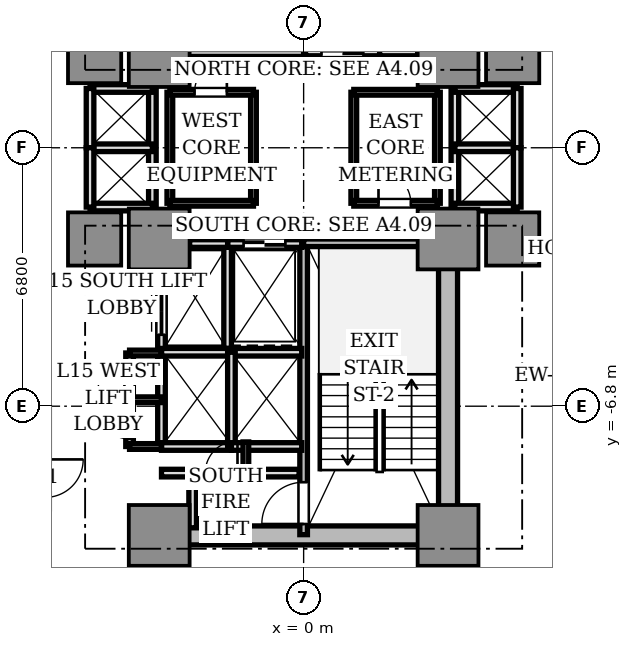
"""IFC4 building model, lengths in metres.
Left out: names, types, materials, properties, quantities, classifications, styles, units other than length and angle.
Written with IfcOpenShell. Run it as: python <this file> out.ifc"""

import sys

from ifc_helpers import new_model, si_unit, direction, frame, frame_2d, origin, origin_2d, place, context, subcontext, project, spatial, rectangle, extrude, source, transform, mapped, element, fill, save


model = new_model("IFC4")
c1 = context("Model", 3, precision=1e-05, world=origin(), true_north=direction((0.0, 1.0)))
c2 = subcontext(c1, "Body", "Model", "MODEL_VIEW")
j1 = project(units=[si_unit("LENGTHUNIT", "METRE"), si_unit("PLANEANGLEUNIT", "RADIAN")], contexts=[c1])
p1 = place(None, origin())
s1 = spatial("IfcSite", under=j1, at=p1, CompositionType="ELEMENT")
p2 = place(p1, origin())
s2 = spatial("IfcBuilding", under=s1, at=p2, CompositionType="ELEMENT")
p3 = place(p2, frame((0.0, 0.0, 57.75)))
s3 = spatial("IfcBuildingStorey", under=s2, at=p3, CompositionType="ELEMENT", Elevation=57.75)
p4 = place(p3, frame((-3.55, -10.2, 0.0), z_axis=(0.0, 0.0, 1.0), x_axis=(1.0, 0.0, 0.0)))
e1 = element("IfcWall", 1, at=p4, inside=s3, PredefinedType="SHEAR", context=c2, shape_type="SweptSolid", body=[
    extrude(rectangle(XDim=7.1, YDim=0.5, at=frame_2d((3.55, 0.0))), origin(), (0.0, 0.0, 1.0), 3.11),
])
p5 = place(p3, frame((3.8, -9.75, 0.0), z_axis=(0.0, 0.0, 1.0), x_axis=(0.0, 1.0, 0.0)))
e2 = element("IfcWall", 2, at=p5, inside=s3, PredefinedType="SHEAR", context=c2, shape_type="SweptSolid", body=[
    extrude(rectangle(XDim=6.9, YDim=0.5, at=frame_2d((3.45, 0.0))), origin(), (0.0, 0.0, 1.0), 3.11),
])
m1 = source(origin(), c2, "Body", "SweptSolid", [
    extrude(rectangle(XDim=1.6, YDim=1.6, at=origin_2d()), origin(), (0.0, 0.0, 1.0), 3.11),
])
for number, where, z_axis, x_axis in (
    (3, (-3.8, 2.4, 0.0), (0.0, 0.0, 1.0), (1.0, 0.0, 0.0)),
    (4, (3.8, 2.4, 0.0), (0.0, 0.0, 1.0), (1.0, 0.0, 0.0)),
    (5, (-3.8, -2.4, 0.0), (0.0, 0.0, 1.0), (1.0, 0.0, 0.0)),
    (6, (3.8, -2.4, 0.0), (0.0, 0.0, 1.0), (1.0, 0.0, 0.0)),
    (7, (-3.8, -10.2, 0.0), (0.0, 0.0, 1.0), (1.0, 0.0, 0.0)),
    (8, (3.8, -10.2, 0.0), (0.0, 0.0, 1.0), (1.0, 0.0, 0.0)),
):
    element("IfcColumn", number, at=place(p3, frame(where, z_axis=z_axis, x_axis=x_axis)), inside=s3, PredefinedType="COLUMN", context=c2, shape_type="MappedRepresentation", body=[
        mapped(m1, transform((0.0, 0.0, 0.0), scale=1.0)),
    ])
m2 = source(origin(), c2, "Body", "SweptSolid", [
    extrude(rectangle(XDim=1.4, YDim=1.4, at=origin_2d()), origin(), (0.0, 0.0, 1.0), 3.11),
])
for number, where, z_axis, x_axis in (
    (9, (5.5, 2.4, 0.0), (0.0, 0.0, 1.0), (1.0, 0.0, 0.0)),
    (10, (-5.5, 2.4, 0.0), (0.0, 0.0, 1.0), (1.0, 0.0, 0.0)),
    (11, (5.5, -2.4, 0.0), (0.0, 0.0, 1.0), (1.0, 0.0, 0.0)),
    (12, (-5.5, -2.4, 0.0), (0.0, 0.0, 1.0), (1.0, 0.0, 0.0)),
):
    element("IfcColumn", number, at=place(p3, frame(where, z_axis=z_axis, x_axis=x_axis)), inside=s3, PredefinedType="COLUMN", context=c2, shape_type="MappedRepresentation", body=[
        mapped(m2, transform((0.0, 0.0, 0.0), scale=1.0)),
    ])
p6 = place(p3, frame((0.0, 2.5, 0.0), z_axis=(0.0, 0.0, 1.0), x_axis=(0.0, 1.0, 0.0)))
e13 = element("IfcWall", 13, at=p6, inside=s3, PredefinedType="SOLIDWALL", context=c2, shape_type="SweptSolid", body=[
    extrude(rectangle(XDim=7.68, YDim=0.2, at=frame_2d((3.84, 0.0))), origin(), (0.0, 0.0, 1.0), 3.11),
])
p7 = place(p6, frame((6.5, 0.0, 0.0)))
e14 = element("IfcOpeningElement", 14, at=p7, cuts=e13, PredefinedType="OPENING", context=c2, shape_type="SweptSolid", body=[
    extrude(rectangle(XDim=0.95, YDim=2.15, at=frame_2d((0.475, 1.075))), frame((0.0, 0.11, 0.0), z_axis=(0.0, -1.0, 0.0), x_axis=(1.0, 0.0, 0.0)), (0.0, 0.0, 1.0), 0.22),
])
p8 = place(p3, frame((-3.72, 2.5, 0.0), z_axis=(0.0, 0.0, 1.0), x_axis=(1.0, 0.0, 0.0)))
e15 = element("IfcWall", 15, at=p8, inside=s3, PredefinedType="SOLIDWALL", context=c2, shape_type="SweptSolid", body=[
    extrude(rectangle(XDim=3.72, YDim=0.2, at=frame_2d((1.86, 0.0))), origin(), (0.0, 0.0, 1.0), 3.11),
])
p9 = place(p3, frame((0.0, -10.18, 0.0), z_axis=(0.0, 0.0, 1.0), x_axis=(0.0, 1.0, 0.0)))
e16 = element("IfcWall", 16, at=p9, inside=s3, PredefinedType="SOLIDWALL", context=c2, shape_type="SweptSolid", body=[
    extrude(rectangle(XDim=7.68, YDim=0.2, at=frame_2d((3.84, 0.0))), origin(), (0.0, 0.0, 1.0), 3.11),
])
p10 = place(p9, frame((0.28, 0.0, 0.0)))
e17 = element("IfcOpeningElement", 17, at=p10, cuts=e16, PredefinedType="OPENING", context=c2, shape_type="SweptSolid", body=[
    extrude(rectangle(XDim=1.1, YDim=2.15, at=frame_2d((0.55, 1.075))), frame((0.0, 0.11, 0.0), z_axis=(0.0, -1.0, 0.0), x_axis=(1.0, 0.0, 0.0)), (0.0, 0.0, 1.0), 0.22),
])
p11 = place(p3, frame((0.0, -2.5, 0.0), z_axis=(0.0, 0.0, 1.0), x_axis=(1.0, 0.0, 0.0)))
e18 = element("IfcWall", 18, at=p11, inside=s3, PredefinedType="SOLIDWALL", context=c2, shape_type="SweptSolid", body=[
    extrude(rectangle(XDim=3.72, YDim=0.2, at=frame_2d((1.86, 0.0))), origin(), (0.0, 0.0, 1.0), 3.11),
])
p12 = place(p3, frame((2.0, 2.5, 0.0), z_axis=(0.0, 0.0, 1.0), x_axis=(0.0, 1.0, 0.0)))
e19 = element("IfcWall", 19, at=p12, inside=s3, PredefinedType="SOLIDWALL", context=c2, shape_type="SweptSolid", body=[
    extrude(rectangle(XDim=2.78, YDim=0.2, at=frame_2d((1.39, 0.0))), origin(), (0.0, 0.0, 1.0), 2.66),
])
p13 = place(p3, frame((0.05, 2.52, 0.0), z_axis=(0.0, 0.0, 1.0), x_axis=(1.0, 0.0, 0.0)))
e20 = element("IfcWall", 20, at=p13, inside=s3, PredefinedType="SOLIDWALL", context=c2, shape_type="SweptSolid", body=[
    extrude(rectangle(XDim=1.95, YDim=0.2, at=frame_2d((0.975, 0.0))), origin(), (0.0, 0.0, 1.0), 2.66),
])
p14 = place(p13, frame((0.42, 0.0, 0.0)))
e21 = element("IfcOpeningElement", 21, at=p14, cuts=e20, PredefinedType="OPENING", context=c2, shape_type="SweptSolid", body=[
    extrude(rectangle(XDim=1.1, YDim=2.2, at=frame_2d((0.55, 1.1))), frame((0.0, 0.11, 0.0), z_axis=(0.0, -1.0, 0.0), x_axis=(1.0, 0.0, 0.0)), (0.0, 0.0, 1.0), 0.22),
])
p15 = place(p3, frame((-2.0, -5.28, 0.0), z_axis=(0.0, 0.0, 1.0), x_axis=(0.0, 1.0, 0.0)))
e22 = element("IfcWall", 22, at=p15, inside=s3, PredefinedType="SOLIDWALL", context=c2, shape_type="SweptSolid", body=[
    extrude(rectangle(XDim=2.78, YDim=0.2, at=frame_2d((1.39, 0.0))), origin(), (0.0, 0.0, 1.0), 2.66),
])
p16 = place(p3, frame((-2.0, -2.52, 0.0), z_axis=(0.0, 0.0, 1.0), x_axis=(1.0, 0.0, 0.0)))
e23 = element("IfcWall", 23, at=p16, inside=s3, PredefinedType="SOLIDWALL", context=c2, shape_type="SweptSolid", body=[
    extrude(rectangle(XDim=1.95, YDim=0.2, at=frame_2d((0.975, 0.0))), origin(), (0.0, 0.0, 1.0), 2.66),
])
p17 = place(p16, frame((0.42, 0.0, 0.0)))
e24 = element("IfcOpeningElement", 24, at=p17, cuts=e23, PredefinedType="OPENING", context=c2, shape_type="SweptSolid", body=[
    extrude(rectangle(XDim=1.1, YDim=2.2, at=frame_2d((0.55, 1.1))), frame((0.0, 0.11, 0.0), z_axis=(0.0, -1.0, 0.0), x_axis=(1.0, 0.0, 0.0)), (0.0, 0.0, 1.0), 0.22),
])
for number, where, z_axis, x_axis in (
    (25, (2.0, 2.52, 0.0), (0.0, 0.0, 1.0), (1.0, 0.0, 0.0)),
    (26, (-3.0, -2.52, 0.0), (0.0, 0.0, 1.0), (1.0, 0.0, 0.0)),
):
    element("IfcWall", number, at=place(p3, frame(where, z_axis=z_axis, x_axis=x_axis)), inside=s3, PredefinedType="SOLIDWALL", context=c2, shape_type="SweptSolid", body=[
        extrude(rectangle(XDim=1.0, YDim=0.2, at=frame_2d((0.5, 0.0))), origin(), (0.0, 0.0, 1.0), 2.66),
    ])
p18 = place(p3, frame((-3.74, -5.36, 0.0), z_axis=(0.0, 0.0, 1.0), x_axis=(0.0, 1.0, 0.0)))
e27 = element("IfcWall", 27, at=p18, inside=s3, PredefinedType="SOLIDWALL", context=c2, shape_type="SweptSolid", body=[
    extrude(rectangle(XDim=2.08, YDim=0.2, at=frame_2d((1.04, 0.0))), origin(), (0.0, 0.0, 1.0), 2.66),
])
p19 = place(p18, frame((0.44, 0.0, 0.0)))
e28 = element("IfcOpeningElement", 28, at=p19, cuts=e27, PredefinedType="OPENING", context=c2, shape_type="SweptSolid", body=[
    extrude(rectangle(XDim=1.2, YDim=2.2, at=frame_2d((0.6, 1.1))), frame((0.0, 0.11, 0.0), z_axis=(0.0, -1.0, 0.0), x_axis=(1.0, 0.0, 0.0)), (0.0, 0.0, 1.0), 0.22),
])
p20 = place(p3, frame((-3.74, -7.86, 0.0), z_axis=(0.0, 0.0, 1.0), x_axis=(0.0, 1.0, 0.0)))
e29 = element("IfcWall", 29, at=p20, inside=s3, PredefinedType="SOLIDWALL", context=c2, shape_type="SweptSolid", body=[
    extrude(rectangle(XDim=2.48, YDim=0.2, at=frame_2d((1.24, 0.0))), origin(), (0.0, 0.0, 1.0), 2.66),
])
p21 = place(p3, frame((-3.74, -7.86, 0.0), z_axis=(0.0, 0.0, 1.0), x_axis=(1.0, 0.0, 0.0)))
e30 = element("IfcWall", 30, at=p21, inside=s3, PredefinedType="SOLIDWALL", context=c2, shape_type="SweptSolid", body=[
    extrude(rectangle(XDim=1.84, YDim=0.2, at=frame_2d((0.92, 0.0))), origin(), (0.0, 0.0, 1.0), 2.66),
])
p22 = place(p3, frame((-3.74, -5.38, 0.0), z_axis=(0.0, 0.0, 1.0), x_axis=(1.0, 0.0, 0.0)))
e31 = element("IfcWall", 31, at=p22, inside=s3, PredefinedType="SOLIDWALL", context=c2, shape_type="SweptSolid", body=[
    extrude(rectangle(XDim=3.69, YDim=0.2, at=frame_2d((1.845, 0.0))), origin(), (0.0, 0.0, 1.0), 2.66),
])
p23 = place(p3, frame((-1.9, -7.86, 0.0), z_axis=(0.0, 0.0, 1.0), x_axis=(0.0, 1.0, 0.0)))
e32 = element("IfcWall", 32, at=p23, inside=s3, PredefinedType="SOLIDWALL", context=c2, shape_type="SweptSolid", body=[
    extrude(rectangle(XDim=2.48, YDim=0.2, at=frame_2d((1.24, 0.0))), origin(), (0.0, 0.0, 1.0), 2.66),
])
p24 = place(p3, frame((-1.9, -7.86, 0.0), z_axis=(0.0, 0.0, 1.0), x_axis=(1.0, 0.0, 0.0)))
e33 = element("IfcWall", 33, at=p24, inside=s3, PredefinedType="SOLIDWALL", context=c2, shape_type="SweptSolid", body=[
    extrude(rectangle(XDim=1.85, YDim=0.2, at=frame_2d((0.925, 0.0))), origin(), (0.0, 0.0, 1.0), 2.66),
])
p25 = place(p3, frame((3.98, -1.56, 0.0), z_axis=(0.0, 0.0, 1.0), x_axis=(0.0, 1.0, 0.0)))
e34 = element("IfcWall", 34, at=p25, inside=s3, PredefinedType="SOLIDWALL", context=c2, shape_type="SweptSolid", body=[
    extrude(rectangle(XDim=3.12, YDim=0.2, at=frame_2d((1.56, 0.0))), origin(), (0.0, 0.0, 1.0), 2.18),
])
for number, where, z_axis, x_axis in (
    (35, (3.98, 1.56, 0.0), (0.0, 0.0, 1.0), (1.0, 0.0, 0.0)),
    (36, (3.98, -1.56, 0.0), (0.0, 0.0, 1.0), (1.0, 0.0, 0.0)),
    (37, (3.98, 0.0, 0.0), (0.0, 0.0, 1.0), (1.0, 0.0, 0.0)),
):
    element("IfcWall", number, at=place(p3, frame(where, z_axis=z_axis, x_axis=x_axis)), inside=s3, PredefinedType="SOLIDWALL", context=c2, shape_type="SweptSolid", body=[
        extrude(rectangle(XDim=1.64, YDim=0.2, at=frame_2d((0.82, 0.0))), origin(), (0.0, 0.0, 1.0), 2.66),
    ])
for number, where, z_axis, x_axis in (
    (38, (5.62, 0.0, 0.0), (0.0, 0.0, 1.0), (0.0, 1.0, 0.0)),
    (39, (5.62, -1.56, 0.0), (0.0, 0.0, 1.0), (0.0, 1.0, 0.0)),
):
    element("IfcWall", number, at=place(p3, frame(where, z_axis=z_axis, x_axis=x_axis)), inside=s3, PredefinedType="SOLIDWALL", context=c2, shape_type="SweptSolid", body=[
        extrude(rectangle(XDim=1.56, YDim=0.2, at=frame_2d((0.78, 0.0))), origin(), (0.0, 0.0, 1.0), 2.66),
    ])
p26 = place(p3, frame((-3.98, -1.56, 0.0), z_axis=(0.0, 0.0, 1.0), x_axis=(0.0, 1.0, 0.0)))
e40 = element("IfcWall", 40, at=p26, inside=s3, PredefinedType="SOLIDWALL", context=c2, shape_type="SweptSolid", body=[
    extrude(rectangle(XDim=3.12, YDim=0.2, at=frame_2d((1.56, 0.0))), origin(), (0.0, 0.0, 1.0), 2.18),
])
for number, where, z_axis, x_axis in (
    (41, (-5.62, 1.56, 0.0), (0.0, 0.0, 1.0), (1.0, 0.0, 0.0)),
    (42, (-5.62, -1.56, 0.0), (0.0, 0.0, 1.0), (1.0, 0.0, 0.0)),
    (43, (-5.62, 0.0, 0.0), (0.0, 0.0, 1.0), (1.0, 0.0, 0.0)),
):
    element("IfcWall", number, at=place(p3, frame(where, z_axis=z_axis, x_axis=x_axis)), inside=s3, PredefinedType="SOLIDWALL", context=c2, shape_type="SweptSolid", body=[
        extrude(rectangle(XDim=1.64, YDim=0.2, at=frame_2d((0.82, 0.0))), origin(), (0.0, 0.0, 1.0), 2.66),
    ])
for number, where, z_axis, x_axis in (
    (44, (-5.62, 0.0, 0.0), (0.0, 0.0, 1.0), (0.0, 1.0, 0.0)),
    (45, (-5.62, -1.56, 0.0), (0.0, 0.0, 1.0), (0.0, 1.0, 0.0)),
):
    element("IfcWall", number, at=place(p3, frame(where, z_axis=z_axis, x_axis=x_axis)), inside=s3, PredefinedType="SOLIDWALL", context=c2, shape_type="SweptSolid", body=[
        extrude(rectangle(XDim=1.56, YDim=0.2, at=frame_2d((0.78, 0.0))), origin(), (0.0, 0.0, 1.0), 2.66),
    ])
p27 = place(p3, frame((-3.74, -8.56, 0.0), z_axis=(0.0, 0.0, 1.0), x_axis=(1.0, 0.0, 0.0)))
e46 = element("IfcWall", 46, at=p27, inside=s3, PredefinedType="SOLIDWALL", context=c2, shape_type="SweptSolid", body=[
    extrude(rectangle(XDim=3.62, YDim=0.2, at=frame_2d((1.81, 0.0))), origin(), (0.0, 0.0, 1.0), 2.66),
])
p28 = place(p27, frame((1.15, 0.0, 0.0)))
e47 = element("IfcOpeningElement", 47, at=p28, cuts=e46, PredefinedType="OPENING", context=c2, shape_type="SweptSolid", body=[
    extrude(rectangle(XDim=0.85, YDim=2.1, at=frame_2d((0.425, 1.05))), frame((0.0, 0.11, 0.0), z_axis=(0.0, -1.0, 0.0), x_axis=(1.0, 0.0, 0.0)), (0.0, 0.0, 1.0), 0.22),
])
p29 = place(p3, frame((-2.92, -10.0, 0.0), z_axis=(0.0, 0.0, 1.0), x_axis=(0.0, 1.0, 0.0)))
e48 = element("IfcWall", 48, at=p29, inside=s3, PredefinedType="SOLIDWALL", context=c2, shape_type="SweptSolid", body=[
    extrude(rectangle(XDim=1.44, YDim=0.2, at=frame_2d((0.72, 0.0))), origin(), (0.0, 0.0, 1.0), 2.66),
])
p30 = place(p3, frame((-1.52, -8.56, 0.0), z_axis=(0.0, 0.0, 1.0), x_axis=(0.0, 1.0, 0.0)))
e49 = element("IfcWall", 49, at=p30, inside=s3, PredefinedType="PARTITIONING", context=c2, shape_type="SweptSolid", body=[
    extrude(rectangle(XDim=0.82, YDim=0.15, at=frame_2d((0.41, 0.0))), origin(), (0.0, 0.0, 1.0), 2.66),
])
p31 = place(p3, frame((-4.58, -7.86, 0.0), z_axis=(0.0, 0.0, 1.0), x_axis=(0.0, 1.0, 0.0)))
e50 = element("IfcWall", 50, at=p31, inside=s3, PredefinedType="SOLIDWALL", context=c2, shape_type="SweptSolid", body=[
    extrude(rectangle(XDim=2.46, YDim=0.2, at=frame_2d((1.23, 0.0))), origin(), (0.0, 0.0, 1.0), 2.66),
])
p32 = place(p31, frame((0.2, 0.0, 0.0)))
e51 = element("IfcOpeningElement", 51, at=p32, cuts=e50, PredefinedType="OPENING", context=c2, shape_type="SweptSolid", body=[
    extrude(rectangle(XDim=0.85, YDim=2.1, at=frame_2d((0.425, 1.05))), frame((0.0, 0.11, 0.0), z_axis=(0.0, -1.0, 0.0), x_axis=(1.0, 0.0, 0.0)), (0.0, 0.0, 1.0), 0.22),
])
p33 = place(p31, frame((1.38, 0.0, 0.0)))
e52 = element("IfcOpeningElement", 52, at=p33, cuts=e50, PredefinedType="OPENING", context=c2, shape_type="SweptSolid", body=[
    extrude(rectangle(XDim=0.85, YDim=2.1, at=frame_2d((0.425, 1.05))), frame((0.0, 0.11, 0.0), z_axis=(0.0, -1.0, 0.0), x_axis=(1.0, 0.0, 0.0)), (0.0, 0.0, 1.0), 0.22),
])
for number, where, z_axis, x_axis in (
    (53, (-4.58, -5.4, 0.0), (0.0, 0.0, 1.0), (1.0, 0.0, 0.0)),
    (54, (-4.58, -7.86, 0.0), (0.0, 0.0, 1.0), (1.0, 0.0, 0.0)),
    (55, (-4.58, -6.63, 0.0), (0.0, 0.0, 1.0), (1.0, 0.0, 0.0)),
):
    element("IfcWall", number, at=place(p3, frame(where, z_axis=z_axis, x_axis=x_axis)), inside=s3, PredefinedType="PARTITIONING", context=c2, shape_type="SweptSolid", body=[
        extrude(rectangle(XDim=0.84, YDim=0.15, at=frame_2d((0.42, 0.0))), origin(), (0.0, 0.0, 1.0), 2.66),
    ])
p34 = place(p3, frame((-1.32, -1.46, 0.0), z_axis=(0.0, 0.0, 1.0), x_axis=(0.0, 1.0, 0.0)))
e56 = element("IfcWall", 56, at=p34, inside=s3, PredefinedType="PARTITIONING", context=c2, shape_type="SweptSolid", body=[
    extrude(rectangle(XDim=2.92, YDim=0.15, at=frame_2d((1.46, 0.0))), origin(), (0.0, 0.0, 1.0), 2.66),
])
p35 = place(p3, frame((-3.52, -1.46, 0.0), z_axis=(0.0, 0.0, 1.0), x_axis=(0.0, 1.0, 0.0)))
e57 = element("IfcWall", 57, at=p35, inside=s3, PredefinedType="PARTITIONING", context=c2, shape_type="SweptSolid", body=[
    extrude(rectangle(XDim=2.92, YDim=0.15, at=frame_2d((1.46, 0.0))), origin(), (0.0, 0.0, 1.0), 2.18),
])
p36 = place(p3, frame((-3.52, 1.46, 0.0), z_axis=(0.0, 0.0, 1.0), x_axis=(1.0, 0.0, 0.0)))
e58 = element("IfcWall", 58, at=p36, inside=s3, PredefinedType="PARTITIONING", context=c2, shape_type="SweptSolid", body=[
    extrude(rectangle(XDim=2.2, YDim=0.15, at=frame_2d((1.1, 0.0))), origin(), (0.0, 0.0, 1.0), 2.66),
])
p37 = place(p36, frame((0.65, 0.0, 0.0)))
e59 = element("IfcOpeningElement", 59, at=p37, cuts=e58, PredefinedType="OPENING", context=c2, shape_type="SweptSolid", body=[
    extrude(rectangle(XDim=0.85, YDim=2.1, at=frame_2d((0.425, 1.05))), frame((0.0, 0.085, 0.0), z_axis=(0.0, -1.0, 0.0), x_axis=(1.0, 0.0, 0.0)), (0.0, 0.0, 1.0), 0.17),
])
p38 = place(p3, frame((-3.52, -1.46, 0.0), z_axis=(0.0, 0.0, 1.0), x_axis=(1.0, 0.0, 0.0)))
e60 = element("IfcWall", 60, at=p38, inside=s3, PredefinedType="PARTITIONING", context=c2, shape_type="SweptSolid", body=[
    extrude(rectangle(XDim=2.2, YDim=0.15, at=frame_2d((1.1, 0.0))), origin(), (0.0, 0.0, 1.0), 2.66),
])
p39 = place(p3, frame((1.32, -1.46, 0.0), z_axis=(0.0, 0.0, 1.0), x_axis=(0.0, 1.0, 0.0)))
e61 = element("IfcWall", 61, at=p39, inside=s3, PredefinedType="PARTITIONING", context=c2, shape_type="SweptSolid", body=[
    extrude(rectangle(XDim=2.92, YDim=0.15, at=frame_2d((1.46, 0.0))), origin(), (0.0, 0.0, 1.0), 2.66),
])
p40 = place(p3, frame((3.52, -1.46, 0.0), z_axis=(0.0, 0.0, 1.0), x_axis=(0.0, 1.0, 0.0)))
e62 = element("IfcWall", 62, at=p40, inside=s3, PredefinedType="PARTITIONING", context=c2, shape_type="SweptSolid", body=[
    extrude(rectangle(XDim=2.92, YDim=0.15, at=frame_2d((1.46, 0.0))), origin(), (0.0, 0.0, 1.0), 2.18),
])
p41 = place(p3, frame((1.32, 1.46, 0.0), z_axis=(0.0, 0.0, 1.0), x_axis=(1.0, 0.0, 0.0)))
e63 = element("IfcWall", 63, at=p41, inside=s3, PredefinedType="PARTITIONING", context=c2, shape_type="SweptSolid", body=[
    extrude(rectangle(XDim=2.2, YDim=0.15, at=frame_2d((1.1, 0.0))), origin(), (0.0, 0.0, 1.0), 2.66),
])
p42 = place(p3, frame((1.32, -1.46, 0.0), z_axis=(0.0, 0.0, 1.0), x_axis=(1.0, 0.0, 0.0)))
e64 = element("IfcWall", 64, at=p42, inside=s3, PredefinedType="PARTITIONING", context=c2, shape_type="SweptSolid", body=[
    extrude(rectangle(XDim=2.2, YDim=0.15, at=frame_2d((1.1, 0.0))), origin(), (0.0, 0.0, 1.0), 2.66),
])
p43 = place(p42, frame((0.65, 0.0, 0.0)))
e65 = element("IfcOpeningElement", 65, at=p43, cuts=e64, PredefinedType="OPENING", context=c2, shape_type="SweptSolid", body=[
    extrude(rectangle(XDim=0.85, YDim=2.1, at=frame_2d((0.425, 1.05))), frame((0.0, 0.085, 0.0), z_axis=(0.0, -1.0, 0.0), x_axis=(1.0, 0.0, 0.0)), (0.0, 0.0, 1.0), 0.17),
])
m3 = source(origin(), c2, "Body", "SweptSolid", [
    extrude(rectangle(XDim=1.1, YDim=0.05, at=origin_2d()), origin(), (0.0, 0.0, 1.0), 2.2),
])
p44 = place(p14, frame((0.55, 0.0, 0.0)))
e66 = element("IfcDoor", 66, at=p44, inside=s3, OperationType="DOUBLE_DOOR_SLIDING", PredefinedType="DOOR", context=c2, shape_type="MappedRepresentation", body=[
    mapped(m3, transform((0.0, 0.0, 0.0), scale=1.0)),
])
fill(e21, e66)
p45 = place(p17, frame((0.55, 0.0, 0.0)))
e67 = element("IfcDoor", 67, at=p45, inside=s3, OperationType="DOUBLE_DOOR_SLIDING", PredefinedType="DOOR", context=c2, shape_type="MappedRepresentation", body=[
    mapped(m3, transform((0.0, 0.0, 0.0), scale=1.0)),
])
fill(e24, e67)
m4 = source(origin(), c2, "Body", "SweptSolid", [
    extrude(rectangle(XDim=1.2, YDim=0.05, at=origin_2d()), origin(), (0.0, 0.0, 1.0), 2.2),
])
p46 = place(p19, frame((0.6, 0.0, 0.0)))
e68 = element("IfcDoor", 68, at=p46, inside=s3, OperationType="DOUBLE_DOOR_SLIDING", PredefinedType="DOOR", context=c2, shape_type="MappedRepresentation", body=[
    mapped(m4, transform((0.0, 0.0, 0.0), scale=1.0)),
])
fill(e28, e68)
m5 = source(origin(), c2, "Body", "SweptSolid", [
    extrude(rectangle(XDim=1.1, YDim=0.05, at=origin_2d()), origin(), (0.0, 0.0, 1.0), 2.15),
])
p47 = place(p10, frame((0.55, 0.0, 0.0)))
e69 = element("IfcDoor", 69, at=p47, inside=s3, OperationType="SINGLE_SWING_LEFT", PredefinedType="DOOR", context=c2, shape_type="MappedRepresentation", body=[
    mapped(m5, transform((0.0, 0.0, 0.0), scale=1.0)),
])
fill(e17, e69)
m6 = source(origin(), c2, "Body", "SweptSolid", [
    extrude(rectangle(XDim=0.85, YDim=0.05, at=origin_2d()), origin(), (0.0, 0.0, 1.0), 2.1),
])
p48 = place(p28, frame((0.425, 0.0, 0.0)))
e70 = element("IfcDoor", 70, at=p48, inside=s3, OperationType="SINGLE_SWING_RIGHT", PredefinedType="DOOR", context=c2, shape_type="MappedRepresentation", body=[
    mapped(m6, transform((0.0, 0.0, 0.0), scale=1.0)),
])
fill(e47, e70)
p49 = place(p32, frame((0.425, 0.0, 0.0)))
e71 = element("IfcDoor", 71, at=p49, inside=s3, OperationType="SINGLE_SWING_RIGHT", PredefinedType="DOOR", context=c2, shape_type="MappedRepresentation", body=[
    mapped(m6, transform((0.0, 0.0, 0.0), scale=1.0)),
])
fill(e51, e71)
p50 = place(p33, frame((0.425, 0.0, 0.0)))
e72 = element("IfcDoor", 72, at=p50, inside=s3, OperationType="SINGLE_SWING_LEFT", PredefinedType="DOOR", context=c2, shape_type="MappedRepresentation", body=[
    mapped(m6, transform((0.0, 0.0, 0.0), scale=1.0)),
])
fill(e52, e72)
p51 = place(p37, frame((0.425, 0.0, 0.0)))
e73 = element("IfcDoor", 73, at=p51, inside=s3, OperationType="SINGLE_SWING_RIGHT", PredefinedType="DOOR", context=c2, shape_type="MappedRepresentation", body=[
    mapped(m6, transform((0.0, 0.0, 0.0), scale=1.0)),
])
fill(e59, e73)
p52 = place(p43, frame((0.425, 0.0, 0.0)))
e74 = element("IfcDoor", 74, at=p52, inside=s3, OperationType="SINGLE_SWING_LEFT", PredefinedType="DOOR", context=c2, shape_type="MappedRepresentation", body=[
    mapped(m6, transform((0.0, 0.0, 0.0), scale=1.0)),
])
fill(e65, e74)
save(model, sys.argv[1])
